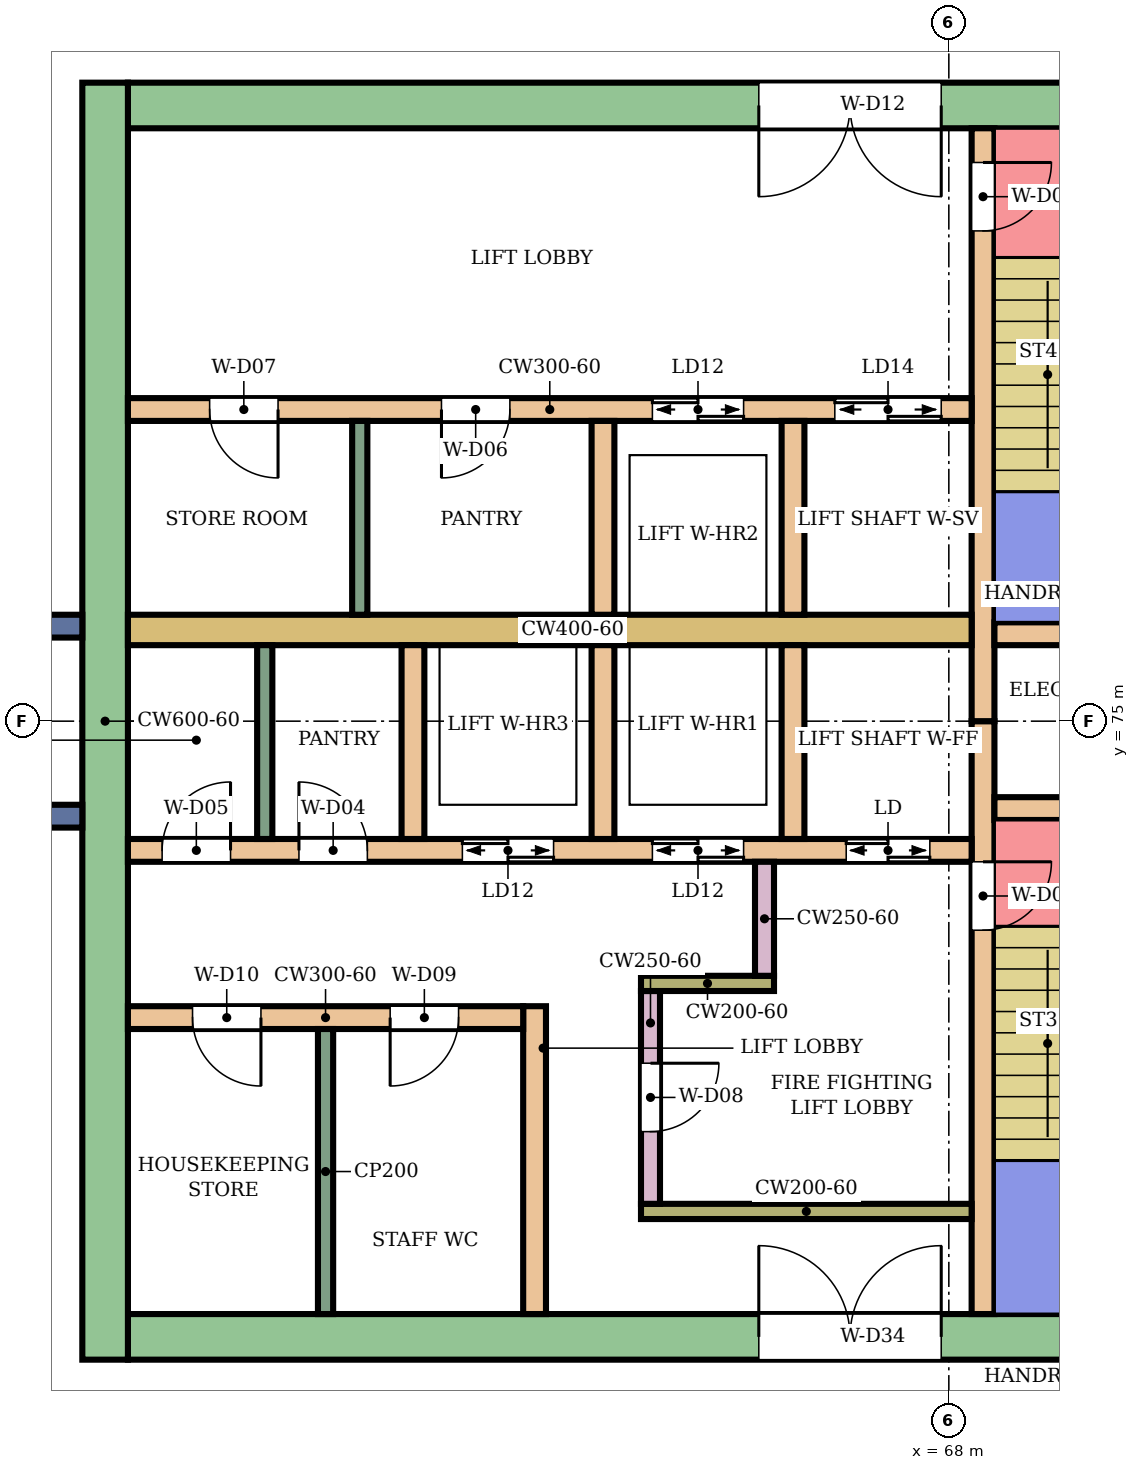
"""IFC4 building model, lengths in metres.
Left out: names, types, materials, properties, quantities, classifications, styles, units other than length and angle.
Written with IfcOpenShell. Run it as: python <this file> out.ifc"""

import sys

from ifc_helpers import new_model, si_unit, direction, frame, frame_2d, origin, place, context, subcontext, project, spatial, rectangle, extrude, element, fill, save


model = new_model("IFC4")
c1 = context("Model", 3, precision=1e-05, world=origin(), true_north=direction((0.0, 1.0)))
c2 = subcontext(c1, "Body", "Model", "MODEL_VIEW")
j1 = project(units=[si_unit("LENGTHUNIT", "METRE"), si_unit("PLANEANGLEUNIT", "RADIAN")], contexts=[c1])
p1 = place(None, origin())
s1 = spatial("IfcSite", under=j1, at=p1, CompositionType="ELEMENT")
p2 = place(p1, origin())
s2 = spatial("IfcBuilding", under=s1, at=p2, CompositionType="ELEMENT")
p3 = place(p2, frame((0.0, 0.0, 245.7)))
s3 = spatial("IfcBuildingStorey", under=s2, at=p3, CompositionType="ELEMENT", Elevation=245.7)
p4 = place(p3, frame((72.1, 66.9, 0.0), z_axis=(0.0, 0.0, 1.0), x_axis=(-1.0, 0.0, 0.0)))
e1 = element("IfcWall", 1, at=p4, inside=s3, PredefinedType="SHEAR", context=c2, shape_type="SweptSolid", body=[
    extrude(rectangle(XDim=14.9, YDim=0.6, at=frame_2d((7.45, 0.0))), origin(), (0.0, 0.0, 1.0), 3.88),
])
p5 = place(p4, frame((4.2, 0.0, 0.0)))
e2 = element("IfcOpeningElement", 2, at=p5, cuts=e1, PredefinedType="OPENING", context=c2, shape_type="SweptSolid", body=[
    extrude(rectangle(XDim=2.4, YDim=2.4, at=frame_2d((1.2, 1.2))), frame((0.0, 0.31, 0.0), z_axis=(0.0, -1.0, 0.0), x_axis=(1.0, 0.0, 0.0)), (0.0, 0.0, 1.0), 0.62),
])
p6 = place(p3, frame((72.1, 83.1, 0.0), z_axis=(0.0, 0.0, 1.0), x_axis=(-1.0, 0.0, 0.0)))
e3 = element("IfcWall", 3, at=p6, inside=s3, PredefinedType="SHEAR", context=c2, shape_type="SweptSolid", body=[
    extrude(rectangle(XDim=14.9, YDim=0.6, at=frame_2d((7.45, 0.0))), origin(), (0.0, 0.0, 1.0), 3.88),
])
p7 = place(p6, frame((4.2, 0.0, 0.0)))
e4 = element("IfcOpeningElement", 4, at=p7, cuts=e3, PredefinedType="OPENING", context=c2, shape_type="SweptSolid", body=[
    extrude(rectangle(XDim=2.4, YDim=2.4, at=frame_2d((1.2, 1.2))), frame((0.0, 0.31, 0.0), z_axis=(0.0, -1.0, 0.0), x_axis=(1.0, 0.0, 0.0)), (0.0, 0.0, 1.0), 0.62),
])
p8 = place(p3, frame((56.9, 83.4, 0.0), z_axis=(0.0, 0.0, 1.0), x_axis=(0.0, -1.0, 0.0)))
e5 = element("IfcWall", 5, at=p8, inside=s3, PredefinedType="SHEAR", context=c2, shape_type="SweptSolid", body=[
    extrude(rectangle(XDim=16.8, YDim=0.6, at=frame_2d((8.4, 0.0))), origin(), (0.0, 0.0, 1.0), 3.88),
])
p9 = place(p3, frame((68.45, 75.0, 0.0), z_axis=(0.0, 0.0, 1.0), x_axis=(0.0, -1.0, 0.0)))
e6 = element("IfcWall", 6, at=p9, inside=s3, PredefinedType="SHEAR", context=c2, shape_type="SweptSolid", body=[
    extrude(rectangle(XDim=7.8, YDim=0.3, at=frame_2d((3.9, 0.0))), origin(), (0.0, 0.0, 1.0), 3.88),
])
p10 = place(p9, frame((1.85, 0.0, 0.0)))
e7 = element("IfcOpeningElement", 7, at=p10, cuts=e6, PredefinedType="OPENING", context=c2, shape_type="SweptSolid", body=[
    extrude(rectangle(XDim=0.9, YDim=2.1, at=frame_2d((0.45, 1.05))), frame((0.0, 0.16, 0.0), z_axis=(0.0, -1.0, 0.0), x_axis=(1.0, 0.0, 0.0)), (0.0, 0.0, 1.0), 0.32),
])
p11 = place(p3, frame((68.45, 82.8, 0.0), z_axis=(0.0, 0.0, 1.0), x_axis=(0.0, -1.0, 0.0)))
e8 = element("IfcWall", 8, at=p11, inside=s3, PredefinedType="SHEAR", context=c2, shape_type="SweptSolid", body=[
    extrude(rectangle(XDim=7.8, YDim=0.3, at=frame_2d((3.9, 0.0))), origin(), (0.0, 0.0, 1.0), 3.88),
])
p12 = place(p11, frame((0.45, 0.0, 0.0)))
e9 = element("IfcOpeningElement", 9, at=p12, cuts=e8, PredefinedType="OPENING", context=c2, shape_type="SweptSolid", body=[
    extrude(rectangle(XDim=0.9, YDim=2.1, at=frame_2d((0.45, 1.05))), frame((0.0, 0.16, 0.0), z_axis=(0.0, -1.0, 0.0), x_axis=(1.0, 0.0, 0.0)), (0.0, 0.0, 1.0), 0.32),
])
p13 = place(p3, frame((71.65, 73.85, 0.0), z_axis=(0.0, 0.0, 1.0), x_axis=(-1.0, 0.0, 0.0)))
e10 = element("IfcWall", 10, at=p13, inside=s3, PredefinedType="SHEAR", context=c2, shape_type="SweptSolid", body=[
    extrude(rectangle(XDim=3.05, YDim=0.3, at=frame_2d((1.525, 0.0))), origin(), (0.0, 0.0, 1.0), 3.88),
])
p14 = place(p13, frame((1.1, 0.0, 0.0)))
e11 = element("IfcOpeningElement", 11, at=p14, cuts=e10, PredefinedType="OPENING", context=c2, shape_type="SweptSolid", body=[
    extrude(rectangle(XDim=0.7, YDim=2.0, at=frame_2d((0.35, 1.0))), frame((0.0, 0.16, 0.0), z_axis=(0.0, -1.0, 0.0), x_axis=(1.0, 0.0, 0.0)), (0.0, 0.0, 1.0), 0.32),
])
p15 = place(p3, frame((71.65, 76.15, 0.0), z_axis=(0.0, 0.0, 1.0), x_axis=(-1.0, 0.0, 0.0)))
e12 = element("IfcWall", 12, at=p15, inside=s3, PredefinedType="SHEAR", context=c2, shape_type="SweptSolid", body=[
    extrude(rectangle(XDim=3.05, YDim=0.3, at=frame_2d((1.525, 0.0))), origin(), (0.0, 0.0, 1.0), 3.88),
])
p16 = place(p3, frame((68.3, 73.3, 0.0), z_axis=(0.0, 0.0, 1.0), x_axis=(-1.0, 0.0, 0.0)))
e13 = element("IfcWall", 13, at=p16, inside=s3, PredefinedType="SHEAR", context=c2, shape_type="SweptSolid", body=[
    extrude(rectangle(XDim=11.1, YDim=0.3, at=frame_2d((5.55, 0.0))), origin(), (0.0, 0.0, 1.0), 3.88),
])
p17 = place(p16, frame((0.55, 0.0, 0.0)))
e14 = element("IfcOpeningElement", 14, at=p17, cuts=e13, PredefinedType="OPENING", context=c2, shape_type="SweptSolid", body=[
    extrude(rectangle(XDim=1.1, YDim=2.1, at=frame_2d((0.55, 1.05))), frame((0.0, 0.16, 0.0), z_axis=(0.0, -1.0, 0.0), x_axis=(1.0, 0.0, 0.0)), (0.0, 0.0, 1.0), 0.32),
])
p18 = place(p16, frame((3.0, 0.0, 0.0)))
e15 = element("IfcOpeningElement", 15, at=p18, cuts=e13, PredefinedType="OPENING", context=c2, shape_type="SweptSolid", body=[
    extrude(rectangle(XDim=1.2, YDim=2.1, at=frame_2d((0.6, 1.05))), frame((0.0, 0.16, 0.0), z_axis=(0.0, -1.0, 0.0), x_axis=(1.0, 0.0, 0.0)), (0.0, 0.0, 1.0), 0.32),
])
p19 = place(p16, frame((5.5, 0.0, 0.0)))
e16 = element("IfcOpeningElement", 16, at=p19, cuts=e13, PredefinedType="OPENING", context=c2, shape_type="SweptSolid", body=[
    extrude(rectangle(XDim=1.2, YDim=2.1, at=frame_2d((0.6, 1.05))), frame((0.0, 0.16, 0.0), z_axis=(0.0, -1.0, 0.0), x_axis=(1.0, 0.0, 0.0)), (0.0, 0.0, 1.0), 0.32),
])
p20 = place(p16, frame((7.95, 0.0, 0.0)))
e17 = element("IfcOpeningElement", 17, at=p20, cuts=e13, PredefinedType="OPENING", context=c2, shape_type="SweptSolid", body=[
    extrude(rectangle(XDim=0.9, YDim=2.1, at=frame_2d((0.45, 1.05))), frame((0.0, 0.16, 0.0), z_axis=(0.0, -1.0, 0.0), x_axis=(1.0, 0.0, 0.0)), (0.0, 0.0, 1.0), 0.32),
])
p21 = place(p16, frame((9.75, 0.0, 0.0)))
e18 = element("IfcOpeningElement", 18, at=p21, cuts=e13, PredefinedType="OPENING", context=c2, shape_type="SweptSolid", body=[
    extrude(rectangle(XDim=0.9, YDim=2.1, at=frame_2d((0.45, 1.05))), frame((0.0, 0.16, 0.0), z_axis=(0.0, -1.0, 0.0), x_axis=(1.0, 0.0, 0.0)), (0.0, 0.0, 1.0), 0.32),
])
p22 = place(p3, frame((68.3, 76.2, 0.0), z_axis=(0.0, 0.0, 1.0), x_axis=(-1.0, 0.0, 0.0)))
e19 = element("IfcWall", 19, at=p22, inside=s3, PredefinedType="SHEAR", context=c2, shape_type="SweptSolid", body=[
    extrude(rectangle(XDim=11.1, YDim=0.4, at=frame_2d((5.55, 0.0))), origin(), (0.0, 0.0, 1.0), 3.88),
])
p23 = place(p3, frame((68.3, 79.1, 0.0), z_axis=(0.0, 0.0, 1.0), x_axis=(-1.0, 0.0, 0.0)))
e20 = element("IfcWall", 20, at=p23, inside=s3, PredefinedType="SHEAR", context=c2, shape_type="SweptSolid", body=[
    extrude(rectangle(XDim=11.1, YDim=0.3, at=frame_2d((5.55, 0.0))), origin(), (0.0, 0.0, 1.0), 3.88),
])
p24 = place(p23, frame((0.4, 0.0, 0.0)))
e21 = element("IfcOpeningElement", 21, at=p24, cuts=e20, PredefinedType="OPENING", context=c2, shape_type="SweptSolid", body=[
    extrude(rectangle(XDim=1.4, YDim=2.1, at=frame_2d((0.7, 1.05))), frame((0.0, 0.16, 0.0), z_axis=(0.0, -1.0, 0.0), x_axis=(1.0, 0.0, 0.0)), (0.0, 0.0, 1.0), 0.32),
])
p25 = place(p23, frame((3.0, 0.0, 0.0)))
e22 = element("IfcOpeningElement", 22, at=p25, cuts=e20, PredefinedType="OPENING", context=c2, shape_type="SweptSolid", body=[
    extrude(rectangle(XDim=1.2, YDim=2.1, at=frame_2d((0.6, 1.05))), frame((0.0, 0.16, 0.0), z_axis=(0.0, -1.0, 0.0), x_axis=(1.0, 0.0, 0.0)), (0.0, 0.0, 1.0), 0.32),
])
p26 = place(p23, frame((6.075, 0.0, 0.0)))
e23 = element("IfcOpeningElement", 23, at=p26, cuts=e20, PredefinedType="OPENING", context=c2, shape_type="SweptSolid", body=[
    extrude(rectangle(XDim=0.9, YDim=2.1, at=frame_2d((0.45, 1.05))), frame((0.0, 0.16, 0.0), z_axis=(0.0, -1.0, 0.0), x_axis=(1.0, 0.0, 0.0)), (0.0, 0.0, 1.0), 0.32),
])
p27 = place(p23, frame((9.125, 0.0, 0.0)))
e24 = element("IfcOpeningElement", 24, at=p27, cuts=e20, PredefinedType="OPENING", context=c2, shape_type="SweptSolid", body=[
    extrude(rectangle(XDim=0.9, YDim=2.1, at=frame_2d((0.45, 1.05))), frame((0.0, 0.16, 0.0), z_axis=(0.0, -1.0, 0.0), x_axis=(1.0, 0.0, 0.0)), (0.0, 0.0, 1.0), 0.32),
])
for number, where, z_axis, x_axis in (
    (25, (65.95, 76.0, 0.0), (0.0, 0.0, 1.0), (0.0, -1.0, 0.0)),
    (26, (63.45, 76.0, 0.0), (0.0, 0.0, 1.0), (0.0, -1.0, 0.0)),
    (27, (60.95, 76.0, 0.0), (0.0, 0.0, 1.0), (0.0, -1.0, 0.0)),
    (28, (65.95, 78.95, 0.0), (0.0, 0.0, 1.0), (0.0, -1.0, 0.0)),
    (29, (63.45, 78.95, 0.0), (0.0, 0.0, 1.0), (0.0, -1.0, 0.0)),
):
    element("IfcWall", number, at=place(p3, frame(where, z_axis=z_axis, x_axis=x_axis)), inside=s3, PredefinedType="SHEAR", context=c2, shape_type="SweptSolid", body=[
        extrude(rectangle(XDim=2.55, YDim=0.3, at=frame_2d((1.275, 0.0))), origin(), (0.0, 0.0, 1.0), 3.88),
    ])
p28 = place(p3, frame((68.3, 68.55, 0.0), z_axis=(0.0, 0.0, 1.0), x_axis=(-1.0, 0.0, 0.0)))
e30 = element("IfcWall", 30, at=p28, inside=s3, PredefinedType="SHEAR", context=c2, shape_type="SweptSolid", body=[
    extrude(rectangle(XDim=4.35, YDim=0.2, at=frame_2d((2.175, 0.0))), origin(), (0.0, 0.0, 1.0), 3.88),
])
p29 = place(p3, frame((64.075, 71.45, 0.0), z_axis=(0.0, 0.0, 1.0), x_axis=(0.0, -1.0, 0.0)))
e31 = element("IfcWall", 31, at=p29, inside=s3, PredefinedType="SHEAR", context=c2, shape_type="SweptSolid", body=[
    extrude(rectangle(XDim=2.8, YDim=0.25, at=frame_2d((1.4, 0.0))), origin(), (0.0, 0.0, 1.0), 3.88),
])
p30 = place(p29, frame((0.95, 0.0, 0.0)))
e32 = element("IfcOpeningElement", 32, at=p30, cuts=e31, PredefinedType="OPENING", context=c2, shape_type="SweptSolid", body=[
    extrude(rectangle(XDim=0.9, YDim=2.1, at=frame_2d((0.45, 1.05))), frame((0.0, 0.135, 0.0), z_axis=(0.0, -1.0, 0.0), x_axis=(1.0, 0.0, 0.0)), (0.0, 0.0, 1.0), 0.27),
])
p31 = place(p3, frame((65.7, 71.55, 0.0), z_axis=(0.0, 0.0, 1.0), x_axis=(-1.0, 0.0, 0.0)))
e33 = element("IfcWall", 33, at=p31, inside=s3, PredefinedType="SHEAR", context=c2, shape_type="SweptSolid", body=[
    extrude(rectangle(XDim=1.75, YDim=0.2, at=frame_2d((0.875, 0.0))), origin(), (0.0, 0.0, 1.0), 3.88),
])
p32 = place(p3, frame((65.575, 73.15, 0.0), z_axis=(0.0, 0.0, 1.0), x_axis=(0.0, -1.0, 0.0)))
e34 = element("IfcWall", 34, at=p32, inside=s3, PredefinedType="SHEAR", context=c2, shape_type="SweptSolid", body=[
    extrude(rectangle(XDim=1.5, YDim=0.25, at=frame_2d((0.75, 0.0))), origin(), (0.0, 0.0, 1.0), 3.88),
])
p33 = place(p3, frame((62.55, 71.25, 0.0), z_axis=(0.0, 0.0, 1.0), x_axis=(0.0, -1.0, 0.0)))
e35 = element("IfcWall", 35, at=p33, inside=s3, PredefinedType="SHEAR", context=c2, shape_type="SweptSolid", body=[
    extrude(rectangle(XDim=4.05, YDim=0.3, at=frame_2d((2.025, 0.0))), origin(), (0.0, 0.0, 1.0), 3.88),
])
p34 = place(p3, frame((62.4, 71.1, 0.0), z_axis=(0.0, 0.0, 1.0), x_axis=(-1.0, 0.0, 0.0)))
e36 = element("IfcWall", 36, at=p34, inside=s3, PredefinedType="SHEAR", context=c2, shape_type="SweptSolid", body=[
    extrude(rectangle(XDim=5.2, YDim=0.3, at=frame_2d((2.6, 0.0))), origin(), (0.0, 0.0, 1.0), 3.88),
])
p35 = place(p34, frame((0.85, 0.0, 0.0)))
e37 = element("IfcOpeningElement", 37, at=p35, cuts=e36, PredefinedType="OPENING", context=c2, shape_type="SweptSolid", body=[
    extrude(rectangle(XDim=0.9, YDim=2.1, at=frame_2d((0.45, 1.05))), frame((0.0, 0.16, 0.0), z_axis=(0.0, -1.0, 0.0), x_axis=(1.0, 0.0, 0.0)), (0.0, 0.0, 1.0), 0.32),
])
p36 = place(p34, frame((3.45, 0.0, 0.0)))
e38 = element("IfcOpeningElement", 38, at=p36, cuts=e36, PredefinedType="OPENING", context=c2, shape_type="SweptSolid", body=[
    extrude(rectangle(XDim=0.9, YDim=2.1, at=frame_2d((0.45, 1.05))), frame((0.0, 0.16, 0.0), z_axis=(0.0, -1.0, 0.0), x_axis=(1.0, 0.0, 0.0)), (0.0, 0.0, 1.0), 0.32),
])
for number, where, z_axis, x_axis in (
    (39, (56.6, 76.25, 0.0), (0.0, 0.0, 1.0), (-1.0, 0.0, 0.0)),
    (40, (56.6, 73.75, 0.0), (0.0, 0.0, 1.0), (-1.0, 0.0, 0.0)),
):
    element("IfcWall", number, at=place(p3, frame(where, z_axis=z_axis, x_axis=x_axis)), inside=s3, PredefinedType="NOTDEFINED", context=c2, shape_type="SweptSolid", body=[
        extrude(rectangle(XDim=2.416, YDim=0.3, at=frame_2d((1.208, 0.0))), origin(), (0.0, 0.0, 1.0), 4.2),
    ])
for number, where, z_axis, x_axis in (
    (41, (59.0, 76.0, 0.0), (0.0, 0.0, 1.0), (0.0, -1.0, 0.0)),
    (42, (60.25, 78.95, 0.0), (0.0, 0.0, 1.0), (0.0, -1.0, 0.0)),
):
    element("IfcWall", number, at=place(p3, frame(where, z_axis=z_axis, x_axis=x_axis)), inside=s3, PredefinedType="PARTITIONING", context=c2, shape_type="SweptSolid", body=[
        extrude(rectangle(XDim=2.55, YDim=0.2, at=frame_2d((1.275, 0.0))), origin(), (0.0, 0.0, 1.0), 3.88),
    ])
p37 = place(p3, frame((59.8, 70.95, 0.0), z_axis=(0.0, 0.0, 1.0), x_axis=(0.0, -1.0, 0.0)))
e43 = element("IfcWall", 43, at=p37, inside=s3, PredefinedType="PARTITIONING", context=c2, shape_type="SweptSolid", body=[
    extrude(rectangle(XDim=3.75, YDim=0.2, at=frame_2d((1.875, 0.0))), origin(), (0.0, 0.0, 1.0), 3.88),
])
p38 = place(p10, origin())
e44 = element("IfcDoor", 44, at=p38, inside=s3, OperationType="SINGLE_SWING_LEFT", PredefinedType="DOOR", context=c2, shape_type="SweptSolid", body=[
    extrude(rectangle(XDim=0.9, YDim=2.1, at=frame_2d((0.45, 1.05))), frame((0.0, 0.025, 0.0), z_axis=(0.0, -1.0, 0.0), x_axis=(1.0, 0.0, 0.0)), (0.0, 0.0, 1.0), 0.05),
])
fill(e7, e44)
p39 = place(p12, origin())
e45 = element("IfcDoor", 45, at=p39, inside=s3, OperationType="SINGLE_SWING_LEFT", PredefinedType="DOOR", context=c2, shape_type="SweptSolid", body=[
    extrude(rectangle(XDim=0.9, YDim=2.1, at=frame_2d((0.45, 1.05))), frame((0.0, 0.025, 0.0), z_axis=(0.0, -1.0, 0.0), x_axis=(1.0, 0.0, 0.0)), (0.0, 0.0, 1.0), 0.05),
])
fill(e9, e45)
p40 = place(p17, origin())
e46 = element("IfcDoor", 46, at=p40, inside=s3, OperationType="DOUBLE_DOOR_SLIDING", PredefinedType="DOOR", context=c2, shape_type="SweptSolid", body=[
    extrude(rectangle(XDim=1.1, YDim=2.1, at=frame_2d((0.55, 1.05))), frame((0.0, 0.025, 0.0), z_axis=(0.0, -1.0, 0.0), x_axis=(1.0, 0.0, 0.0)), (0.0, 0.0, 1.0), 0.05),
])
fill(e14, e46)
p41 = place(p18, origin())
e47 = element("IfcDoor", 47, at=p41, inside=s3, OperationType="DOUBLE_DOOR_SLIDING", PredefinedType="DOOR", context=c2, shape_type="SweptSolid", body=[
    extrude(rectangle(XDim=1.2, YDim=2.1, at=frame_2d((0.6, 1.05))), frame((0.0, 0.025, 0.0), z_axis=(0.0, -1.0, 0.0), x_axis=(1.0, 0.0, 0.0)), (0.0, 0.0, 1.0), 0.05),
])
fill(e15, e47)
p42 = place(p19, origin())
e48 = element("IfcDoor", 48, at=p42, inside=s3, OperationType="DOUBLE_DOOR_SLIDING", PredefinedType="DOOR", context=c2, shape_type="SweptSolid", body=[
    extrude(rectangle(XDim=1.2, YDim=2.1, at=frame_2d((0.6, 1.05))), frame((0.0, 0.025, 0.0), z_axis=(0.0, -1.0, 0.0), x_axis=(1.0, 0.0, 0.0)), (0.0, 0.0, 1.0), 0.05),
])
fill(e16, e48)
p43 = place(p20, frame((0.9, 0.0, 0.0), z_axis=(0.0, 0.0, 1.0), x_axis=(-1.0, 0.0, 0.0)))
e49 = element("IfcDoor", 49, at=p43, inside=s3, OperationType="SINGLE_SWING_LEFT", PredefinedType="DOOR", context=c2, shape_type="SweptSolid", body=[
    extrude(rectangle(XDim=0.9, YDim=2.1, at=frame_2d((0.45, 1.05))), frame((0.0, 0.025, 0.0), z_axis=(0.0, -1.0, 0.0), x_axis=(1.0, 0.0, 0.0)), (0.0, 0.0, 1.0), 0.05),
])
fill(e17, e49)
p44 = place(p21, frame((0.9, 0.0, 0.0), z_axis=(0.0, 0.0, 1.0), x_axis=(-1.0, 0.0, 0.0)))
e50 = element("IfcDoor", 50, at=p44, inside=s3, OperationType="SINGLE_SWING_RIGHT", PredefinedType="DOOR", context=c2, shape_type="SweptSolid", body=[
    extrude(rectangle(XDim=0.9, YDim=2.1, at=frame_2d((0.45, 1.05))), frame((0.0, 0.025, 0.0), z_axis=(0.0, -1.0, 0.0), x_axis=(1.0, 0.0, 0.0)), (0.0, 0.0, 1.0), 0.05),
])
fill(e18, e50)
p45 = place(p24, origin())
e51 = element("IfcDoor", 51, at=p45, inside=s3, OperationType="DOUBLE_DOOR_SLIDING", PredefinedType="DOOR", context=c2, shape_type="SweptSolid", body=[
    extrude(rectangle(XDim=1.4, YDim=2.1, at=frame_2d((0.7, 1.05))), frame((0.0, 0.025, 0.0), z_axis=(0.0, -1.0, 0.0), x_axis=(1.0, 0.0, 0.0)), (0.0, 0.0, 1.0), 0.05),
])
fill(e21, e51)
p46 = place(p25, origin())
e52 = element("IfcDoor", 52, at=p46, inside=s3, OperationType="DOUBLE_DOOR_SLIDING", PredefinedType="DOOR", context=c2, shape_type="SweptSolid", body=[
    extrude(rectangle(XDim=1.2, YDim=2.1, at=frame_2d((0.6, 1.05))), frame((0.0, 0.025, 0.0), z_axis=(0.0, -1.0, 0.0), x_axis=(1.0, 0.0, 0.0)), (0.0, 0.0, 1.0), 0.05),
])
fill(e22, e52)
p47 = place(p26, origin())
e53 = element("IfcDoor", 53, at=p47, inside=s3, OperationType="SINGLE_SWING_RIGHT", PredefinedType="DOOR", context=c2, shape_type="SweptSolid", body=[
    extrude(rectangle(XDim=0.9, YDim=2.1, at=frame_2d((0.45, 1.05))), frame((0.0, 0.025, 0.0), z_axis=(0.0, -1.0, 0.0), x_axis=(1.0, 0.0, 0.0)), (0.0, 0.0, 1.0), 0.05),
])
fill(e23, e53)
p48 = place(p27, origin())
e54 = element("IfcDoor", 54, at=p48, inside=s3, OperationType="SINGLE_SWING_LEFT", PredefinedType="DOOR", context=c2, shape_type="SweptSolid", body=[
    extrude(rectangle(XDim=0.9, YDim=2.1, at=frame_2d((0.45, 1.05))), frame((0.0, 0.025, 0.0), z_axis=(0.0, -1.0, 0.0), x_axis=(1.0, 0.0, 0.0)), (0.0, 0.0, 1.0), 0.05),
])
fill(e24, e54)
p49 = place(p30, origin())
e55 = element("IfcDoor", 55, at=p49, inside=s3, OperationType="SINGLE_SWING_LEFT", PredefinedType="DOOR", context=c2, shape_type="SweptSolid", body=[
    extrude(rectangle(XDim=0.9, YDim=2.1, at=frame_2d((0.45, 1.05))), frame((0.0, 0.025, 0.0), z_axis=(0.0, -1.0, 0.0), x_axis=(1.0, 0.0, 0.0)), (0.0, 0.0, 1.0), 0.05),
])
fill(e32, e55)
p50 = place(p35, origin())
e56 = element("IfcDoor", 56, at=p50, inside=s3, OperationType="SINGLE_SWING_RIGHT", PredefinedType="DOOR", context=c2, shape_type="SweptSolid", body=[
    extrude(rectangle(XDim=0.9, YDim=2.1, at=frame_2d((0.45, 1.05))), frame((0.0, 0.025, 0.0), z_axis=(0.0, -1.0, 0.0), x_axis=(1.0, 0.0, 0.0)), (0.0, 0.0, 1.0), 0.05),
])
fill(e37, e56)
p51 = place(p36, origin())
e57 = element("IfcDoor", 57, at=p51, inside=s3, OperationType="SINGLE_SWING_LEFT", PredefinedType="DOOR", context=c2, shape_type="SweptSolid", body=[
    extrude(rectangle(XDim=0.9, YDim=2.1, at=frame_2d((0.45, 1.05))), frame((0.0, 0.025, 0.0), z_axis=(0.0, -1.0, 0.0), x_axis=(1.0, 0.0, 0.0)), (0.0, 0.0, 1.0), 0.05),
])
fill(e38, e57)
p52 = place(p5, frame((2.4, 0.0, 0.0), z_axis=(0.0, 0.0, 1.0), x_axis=(-1.0, 0.0, 0.0)))
e58 = element("IfcDoor", 58, at=p52, inside=s3, OperationType="DOUBLE_DOOR_SINGLE_SWING", PredefinedType="DOOR", context=c2, shape_type="SweptSolid", body=[
    extrude(rectangle(XDim=2.4, YDim=2.4, at=frame_2d((1.2, 1.2))), frame((0.0, 0.025, 0.0), z_axis=(0.0, -1.0, 0.0), x_axis=(1.0, 0.0, 0.0)), (0.0, 0.0, 1.0), 0.05),
])
fill(e2, e58)
p53 = place(p7, origin())
e59 = element("IfcDoor", 59, at=p53, inside=s3, OperationType="DOUBLE_DOOR_SINGLE_SWING", PredefinedType="DOOR", context=c2, shape_type="SweptSolid", body=[
    extrude(rectangle(XDim=2.4, YDim=2.4, at=frame_2d((1.2, 1.2))), frame((0.0, 0.025, 0.0), z_axis=(0.0, -1.0, 0.0), x_axis=(1.0, 0.0, 0.0)), (0.0, 0.0, 1.0), 0.05),
])
fill(e4, e59)
save(model, sys.argv[1])
